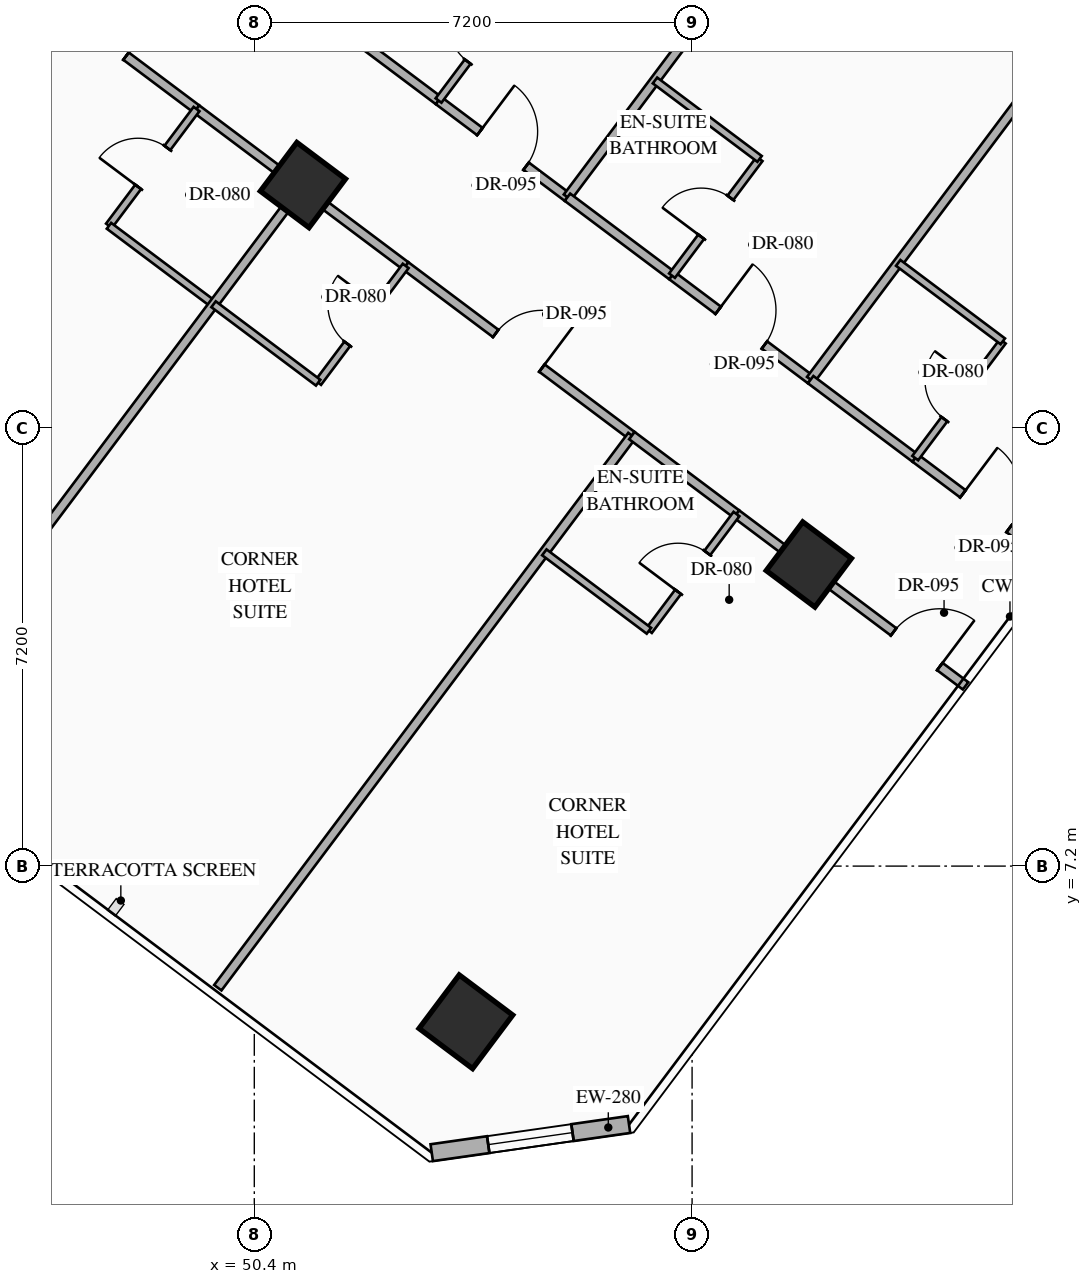
"""IFC4 building model, lengths in metres.
Left out: names, types, materials, properties, quantities, classifications, styles, units other than length and angle.
Written with IfcOpenShell. Run it as: python <this file> out.ifc"""

import sys

from ifc_helpers import new_model, si_unit, direction, frame, frame_2d, origin, origin_2d, place, context, subcontext, project, spatial, rectangle, hollow_rectangle, extrude, element, fill, save


model = new_model("IFC4")
c1 = context("Model", 3, precision=1e-05, world=origin(), true_north=direction((0.0, 1.0)))
c2 = subcontext(c1, "Body", "Model", "MODEL_VIEW")
j1 = project(units=[si_unit("LENGTHUNIT", "METRE"), si_unit("PLANEANGLEUNIT", "RADIAN")], contexts=[c1])
p1 = place(None, origin())
s1 = spatial("IfcSite", under=j1, at=p1, CompositionType="ELEMENT")
p2 = place(p1, origin())
s2 = spatial("IfcBuilding", under=s1, at=p2, CompositionType="ELEMENT")
p3 = place(p2, frame((0.0, 0.0, 63.4)))
s3 = spatial("IfcBuildingStorey", under=s2, at=p3, CompositionType="ELEMENT", Elevation=63.4)
p4 = place(p3, frame((51.2, 18.4, 0.0), z_axis=(0.0, 0.0, 1.0), x_axis=(0.799999996291, -0.600000004945, 0.0)))
e1 = element("IfcColumn", 1, at=p4, inside=s3, PredefinedType="COLUMN", context=c2, shape_type="SweptSolid", body=[
    extrude(hollow_rectangle(XDim=1.0, YDim=1.0, WallThickness=0.038, at=origin_2d()), origin(), (0.0, 0.0, 1.0), 3.35),
])
p5 = place(p3, frame((53.88, 4.64, 0.0), z_axis=(0.0, 0.0, 1.0), x_axis=(0.799999996291, -0.600000004945, 0.0)))
e2 = element("IfcColumn", 2, at=p5, inside=s3, PredefinedType="COLUMN", context=c2, shape_type="SweptSolid", body=[
    extrude(hollow_rectangle(XDim=1.1, YDim=1.1, WallThickness=0.04, at=origin_2d()), origin(), (0.0, 0.0, 1.0), 3.35),
])
p6 = place(p3, frame((59.52, 12.16, 0.0), z_axis=(0.0, 0.0, 1.0), x_axis=(0.799999996291, -0.600000004945, 0.0)))
e3 = element("IfcColumn", 3, at=p6, inside=s3, PredefinedType="COLUMN", context=c2, shape_type="SweptSolid", body=[
    extrude(hollow_rectangle(XDim=1.0, YDim=1.0, WallThickness=0.038, at=origin_2d()), origin(), (0.0, 0.0, 1.0), 3.35),
])
p7 = place(p3, frame((56.563, 2.95, 0.0), z_axis=(0.0, 0.0, 1.0), x_axis=(-0.989977778067, -0.141223223777, 0.0)))
e4 = element("IfcWall", 4, at=p7, inside=s3, PredefinedType="STANDARD", context=c2, shape_type="SweptSolid", body=[
    extrude(rectangle(XDim=3.278, YDim=0.28, at=frame_2d((1.639, 0.0))), origin(), (0.0, 0.0, 1.0), 3.13),
])
p8 = place(p7, frame((0.939, 0.0, 0.85)))
e5 = element("IfcOpeningElement", 5, at=p8, cuts=e4, PredefinedType="OPENING", context=c2, shape_type="SweptSolid", body=[
    extrude(rectangle(XDim=1.4, YDim=1.8, at=frame_2d((0.7, 0.9))), frame((0.0, 0.15, 0.0), z_axis=(0.0, -1.0, 0.0), x_axis=(1.0, 0.0, 0.0)), (0.0, 0.0, 1.0), 0.3),
])
p9 = place(p3, frame((51.71, 21.08, 0.0), z_axis=(0.0, 0.0, 1.0), x_axis=(0.79998637334, -0.60001816845, 0.0)))
e6 = element("IfcWall", 6, at=p9, inside=s3, PredefinedType="PARTITIONING", context=c2, shape_type="SweptSolid", body=[
    extrude(rectangle(XDim=2.15, YDim=0.15, at=frame_2d((1.075, 0.0))), origin(), (0.0, 0.0, 1.0), 2.775),
])
p10 = place(p3, frame((53.43, 19.79, 0.0), z_axis=(0.0, 0.0, 1.0), x_axis=(0.8, -0.6, 0.0)))
e7 = element("IfcWall", 7, at=p10, inside=s3, PredefinedType="PARTITIONING", context=c2, shape_type="SweptSolid", body=[
    extrude(rectangle(XDim=2.65, YDim=0.15, at=frame_2d((1.325, 0.0))), origin(), (0.0, 0.0, 1.0), 2.775),
])
p11 = place(p10, frame((0.85, 0.0, 0.0)))
e8 = element("IfcOpeningElement", 8, at=p11, cuts=e7, PredefinedType="OPENING", context=c2, shape_type="SweptSolid", body=[
    extrude(rectangle(XDim=0.95, YDim=2.15, at=frame_2d((0.475, 1.075))), frame((0.0, 0.085, 0.0), z_axis=(0.0, -1.0, 0.0), x_axis=(1.0, 0.0, 0.0)), (0.0, 0.0, 1.0), 0.17),
])
p12 = place(p3, frame((53.43, 19.79, 0.0), z_axis=(0.0, 0.0, 1.0), x_axis=(0.600065100855, 0.79995117022, 0.0)))
e9 = element("IfcWall", 9, at=p12, inside=s3, PredefinedType="PARTITIONING", context=c2, shape_type="SweptSolid", body=[
    extrude(rectangle(XDim=2.4, YDim=0.12, at=frame_2d((1.2, 0.0))), origin(), (0.0, 0.0, 1.0), 3.13),
])
p13 = place(p12, frame((0.8, 0.0, 0.0)))
e10 = element("IfcOpeningElement", 10, at=p13, cuts=e9, PredefinedType="OPENING", context=c2, shape_type="SweptSolid", body=[
    extrude(rectangle(XDim=0.8, YDim=2.06, at=frame_2d((0.4, 1.03))), frame((0.0, 0.07, 0.0), z_axis=(0.0, -1.0, 0.0), x_axis=(1.0, 0.0, 0.0)), (0.0, 0.0, 1.0), 0.14),
])
p14 = place(p3, frame((55.55, 18.2, 0.0), z_axis=(0.0, 0.0, 1.0), x_axis=(0.599996617946, 0.80000253653, 0.0)))
e11 = element("IfcWall", 11, at=p14, inside=s3, PredefinedType="PARTITIONING", context=c2, shape_type="SweptSolid", body=[
    extrude(rectangle(XDim=11.55, YDim=0.15, at=frame_2d((5.775, 0.0))), origin(), (0.0, 0.0, 1.0), 3.13),
])
p15 = place(p3, frame((55.55, 18.2, 0.0), z_axis=(0.0, 0.0, 1.0), x_axis=(0.79998637334, -0.60001816845, 0.0)))
e12 = element("IfcWall", 12, at=p15, inside=s3, PredefinedType="PARTITIONING", context=c2, shape_type="SweptSolid", body=[
    extrude(rectangle(XDim=2.15, YDim=0.15, at=frame_2d((1.075, 0.0))), origin(), (0.0, 0.0, 1.0), 2.775),
])
p16 = place(p3, frame((57.27, 16.91, 0.0), z_axis=(0.0, 0.0, 1.0), x_axis=(0.800010279488, -0.599986293772, 0.0)))
e13 = element("IfcWall", 13, at=p16, inside=s3, PredefinedType="PARTITIONING", context=c2, shape_type="SweptSolid", body=[
    extrude(rectangle(XDim=2.85, YDim=0.15, at=frame_2d((1.425, 0.0))), origin(), (0.0, 0.0, 1.0), 2.775),
])
p17 = place(p16, frame((0.95, 0.0, 0.0)))
e14 = element("IfcOpeningElement", 14, at=p17, cuts=e13, PredefinedType="OPENING", context=c2, shape_type="SweptSolid", body=[
    extrude(rectangle(XDim=0.95, YDim=2.15, at=frame_2d((0.475, 1.075))), frame((0.0, 0.085, 0.0), z_axis=(0.0, -1.0, 0.0), x_axis=(1.0, 0.0, 0.0)), (0.0, 0.0, 1.0), 0.17),
])
p18 = place(p3, frame((57.27, 16.91, 0.0), z_axis=(0.0, 0.0, 1.0), x_axis=(0.599951172744, 0.800036618114, 0.0)))
e15 = element("IfcWall", 15, at=p18, inside=s3, PredefinedType="PARTITIONING", context=c2, shape_type="SweptSolid", body=[
    extrude(rectangle(XDim=2.4, YDim=0.12, at=frame_2d((1.2, 0.0))), origin(), (0.0, 0.0, 1.0), 3.13),
])
p19 = place(p18, frame((0.8, 0.0, 0.0)))
e16 = element("IfcOpeningElement", 16, at=p19, cuts=e15, PredefinedType="OPENING", context=c2, shape_type="SweptSolid", body=[
    extrude(rectangle(XDim=0.8, YDim=2.06, at=frame_2d((0.4, 1.03))), frame((0.0, 0.07, 0.0), z_axis=(0.0, -1.0, 0.0), x_axis=(1.0, 0.0, 0.0)), (0.0, 0.0, 1.0), 0.14),
])
p20 = place(p3, frame((56.99, 20.12, 0.0), z_axis=(0.0, 0.0, 1.0), x_axis=(0.79998637334, -0.60001816845, 0.0)))
e17 = element("IfcWall", 17, at=p20, inside=s3, PredefinedType="PARTITIONING", context=c2, shape_type="SweptSolid", body=[
    extrude(rectangle(XDim=2.15, YDim=0.12, at=frame_2d((1.075, 0.0))), origin(), (0.0, 0.0, 1.0), 3.13),
])
p21 = place(p3, frame((59.55, 15.2, 0.0), z_axis=(0.0, 0.0, 1.0), x_axis=(0.599996617946, 0.80000253653, 0.0)))
e18 = element("IfcWall", 18, at=p21, inside=s3, PredefinedType="PARTITIONING", context=c2, shape_type="SweptSolid", body=[
    extrude(rectangle(XDim=11.55, YDim=0.15, at=frame_2d((5.775, 0.0))), origin(), (0.0, 0.0, 1.0), 3.13),
])
p22 = place(p3, frame((59.55, 15.2, 0.0), z_axis=(0.0, 0.0, 1.0), x_axis=(0.79998637334, -0.60001816845, 0.0)))
e19 = element("IfcWall", 19, at=p22, inside=s3, PredefinedType="PARTITIONING", context=c2, shape_type="SweptSolid", body=[
    extrude(rectangle(XDim=2.15, YDim=0.15, at=frame_2d((1.075, 0.0))), origin(), (0.0, 0.0, 1.0), 2.775),
])
p23 = place(p3, frame((61.27, 13.91, 0.0), z_axis=(0.0, 0.0, 1.0), x_axis=(0.800010068184, -0.59998657552, 0.0)))
e20 = element("IfcWall", 20, at=p23, inside=s3, PredefinedType="PARTITIONING", context=c2, shape_type="SweptSolid", body=[
    extrude(rectangle(XDim=2.91, YDim=0.15, at=frame_2d((1.455, 0.0))), origin(), (0.0, 0.0, 1.0), 3.13),
])
p24 = place(p23, frame((0.98, 0.0, 0.0)))
e21 = element("IfcOpeningElement", 21, at=p24, cuts=e20, PredefinedType="OPENING", context=c2, shape_type="SweptSolid", body=[
    extrude(rectangle(XDim=0.95, YDim=2.15, at=frame_2d((0.475, 1.075))), frame((0.0, 0.085, 0.0), z_axis=(0.0, -1.0, 0.0), x_axis=(1.0, 0.0, 0.0)), (0.0, 0.0, 1.0), 0.17),
])
p25 = place(p3, frame((61.27, 13.91, 0.0), z_axis=(0.0, 0.0, 1.0), x_axis=(0.599951172744, 0.800036618114, 0.0)))
e22 = element("IfcWall", 22, at=p25, inside=s3, PredefinedType="PARTITIONING", context=c2, shape_type="SweptSolid", body=[
    extrude(rectangle(XDim=2.4, YDim=0.12, at=frame_2d((1.2, 0.0))), origin(), (0.0, 0.0, 1.0), 3.13),
])
p26 = place(p25, frame((0.8, 0.0, 0.0)))
e23 = element("IfcOpeningElement", 23, at=p26, cuts=e22, PredefinedType="OPENING", context=c2, shape_type="SweptSolid", body=[
    extrude(rectangle(XDim=0.8, YDim=2.06, at=frame_2d((0.4, 1.03))), frame((0.0, 0.07, 0.0), z_axis=(0.0, -1.0, 0.0), x_axis=(1.0, 0.0, 0.0)), (0.0, 0.0, 1.0), 0.14),
])
p27 = place(p3, frame((60.99, 17.12, 0.0), z_axis=(0.0, 0.0, 1.0), x_axis=(0.79998637334, -0.60001816845, 0.0)))
e24 = element("IfcWall", 24, at=p27, inside=s3, PredefinedType="PARTITIONING", context=c2, shape_type="SweptSolid", body=[
    extrude(rectangle(XDim=2.15, YDim=0.12, at=frame_2d((1.075, 0.0))), origin(), (0.0, 0.0, 1.0), 3.13),
])
p28 = place(p3, frame((46.37, 21.96, 0.0), z_axis=(0.0, 0.0, 1.0), x_axis=(0.799977170108, -0.600030438649, 0.0)))
e25 = element("IfcWall", 25, at=p28, inside=s3, PredefinedType="PARTITIONING", context=c2, shape_type="SweptSolid", body=[
    extrude(rectangle(XDim=3.85, YDim=0.15, at=frame_2d((1.925, 0.0))), origin(), (0.0, 0.0, 1.0), 2.425),
])
p29 = place(p28, frame((1.45, 0.0, 0.0)))
e26 = element("IfcOpeningElement", 26, at=p29, cuts=e25, PredefinedType="OPENING", context=c2, shape_type="SweptSolid", body=[
    extrude(rectangle(XDim=0.95, YDim=2.15, at=frame_2d((0.475, 1.075))), frame((0.0, 0.085, 0.0), z_axis=(0.0, -1.0, 0.0), x_axis=(1.0, 0.0, 0.0)), (0.0, 0.0, 1.0), 0.17),
])
p30 = place(p3, frame((49.45, 19.65, 0.0), z_axis=(0.0, 0.0, 1.0), x_axis=(0.800040880289, -0.59994548908, 0.0)))
e27 = element("IfcWall", 27, at=p30, inside=s3, PredefinedType="PARTITIONING", context=c2, shape_type="SweptSolid", body=[
    extrude(rectangle(XDim=2.15, YDim=0.15, at=frame_2d((1.075, 0.0))), origin(), (0.0, 0.0, 1.0), 2.425),
])
p31 = place(p3, frame((48.01, 17.73, 0.0), z_axis=(0.0, 0.0, 1.0), x_axis=(0.6, 0.8, 0.0)))
e28 = element("IfcWall", 28, at=p31, inside=s3, PredefinedType="PARTITIONING", context=c2, shape_type="SweptSolid", body=[
    extrude(rectangle(XDim=2.4, YDim=0.12, at=frame_2d((1.2, 0.0))), origin(), (0.0, 0.0, 1.0), 3.13),
])
p32 = place(p31, frame((0.8, 0.0, 0.0)))
e29 = element("IfcOpeningElement", 29, at=p32, cuts=e28, PredefinedType="OPENING", context=c2, shape_type="SweptSolid", body=[
    extrude(rectangle(XDim=0.8, YDim=2.06, at=frame_2d((0.4, 1.03))), frame((0.0, 0.07, 0.0), z_axis=(0.0, -1.0, 0.0), x_axis=(1.0, 0.0, 0.0)), (0.0, 0.0, 1.0), 0.14),
])
p33 = place(p3, frame((48.01, 17.73, 0.0), z_axis=(0.0, 0.0, 1.0), x_axis=(0.79998637334, -0.60001816845, 0.0)))
e30 = element("IfcWall", 30, at=p33, inside=s3, PredefinedType="PARTITIONING", context=c2, shape_type="SweptSolid", body=[
    extrude(rectangle(XDim=2.15, YDim=0.12, at=frame_2d((1.075, 0.0))), origin(), (0.0, 0.0, 1.0), 3.13),
])
p34 = place(p3, frame((44.36, 9.28, 0.0), z_axis=(0.0, 0.0, 1.0), x_axis=(0.599986233332, 0.800010324816, 0.0)))
e31 = element("IfcWall", 31, at=p34, inside=s3, PredefinedType="PARTITIONING", context=c2, shape_type="SweptSolid", body=[
    extrude(rectangle(XDim=11.35, YDim=0.15, at=frame_2d((5.675, 0.0))), origin(), (0.0, 0.0, 1.0), 2.425),
])
p35 = place(p3, frame((51.17, 18.36, 0.0), z_axis=(0.0, 0.0, 1.0), x_axis=(0.79998637334, -0.60001816845, 0.0)))
e32 = element("IfcWall", 32, at=p35, inside=s3, PredefinedType="PARTITIONING", context=c2, shape_type="SweptSolid", body=[
    extrude(rectangle(XDim=2.15, YDim=0.15, at=frame_2d((1.075, 0.0))), origin(), (0.0, 0.0, 1.0), 2.425),
])
p36 = place(p3, frame((52.89, 17.07, 0.0), z_axis=(0.0, 0.0, 1.0), x_axis=(0.800012600101, -0.599983199498, 0.0)))
e33 = element("IfcWall", 33, at=p36, inside=s3, PredefinedType="PARTITIONING", context=c2, shape_type="SweptSolid", body=[
    extrude(rectangle(XDim=4.65, YDim=0.15, at=frame_2d((2.325, 0.0))), origin(), (0.0, 0.0, 1.0), 2.425),
])
p37 = place(p36, frame((1.85, 0.0, 0.0)))
e34 = element("IfcOpeningElement", 34, at=p37, cuts=e33, PredefinedType="OPENING", context=c2, shape_type="SweptSolid", body=[
    extrude(rectangle(XDim=0.95, YDim=2.15, at=frame_2d((0.475, 1.075))), frame((0.0, 0.085, 0.0), z_axis=(0.0, -1.0, 0.0), x_axis=(1.0, 0.0, 0.0)), (0.0, 0.0, 1.0), 0.17),
])
p38 = place(p3, frame((51.45, 15.15, 0.0), z_axis=(0.0, 0.0, 1.0), x_axis=(0.599951172744, 0.800036618114, 0.0)))
e35 = element("IfcWall", 35, at=p38, inside=s3, PredefinedType="PARTITIONING", context=c2, shape_type="SweptSolid", body=[
    extrude(rectangle(XDim=2.4, YDim=0.12, at=frame_2d((1.2, 0.0))), origin(), (0.0, 0.0, 1.0), 3.13),
])
p39 = place(p38, frame((0.8, 0.0, 0.0)))
e36 = element("IfcOpeningElement", 36, at=p39, cuts=e35, PredefinedType="OPENING", context=c2, shape_type="SweptSolid", body=[
    extrude(rectangle(XDim=0.8, YDim=2.06, at=frame_2d((0.4, 1.03))), frame((0.0, 0.07, 0.0), z_axis=(0.0, -1.0, 0.0), x_axis=(1.0, 0.0, 0.0)), (0.0, 0.0, 1.0), 0.14),
])
p40 = place(p3, frame((49.73, 16.44, 0.0), z_axis=(0.0, 0.0, 1.0), x_axis=(0.79998637334, -0.60001816845, 0.0)))
e37 = element("IfcWall", 37, at=p40, inside=s3, PredefinedType="PARTITIONING", context=c2, shape_type="SweptSolid", body=[
    extrude(rectangle(XDim=2.15, YDim=0.12, at=frame_2d((1.075, 0.0))), origin(), (0.0, 0.0, 1.0), 3.13),
])
p41 = place(p3, frame((49.8, 5.2, 0.0), z_axis=(0.0, 0.0, 1.0), x_axis=(0.6, 0.8, 0.0)))
e38 = element("IfcWall", 38, at=p41, inside=s3, PredefinedType="PARTITIONING", context=c2, shape_type="SweptSolid", body=[
    extrude(rectangle(XDim=11.35, YDim=0.15, at=frame_2d((5.675, 0.0))), origin(), (0.0, 0.0, 1.0), 3.13),
])
p42 = place(p3, frame((56.61, 14.28, 0.0), z_axis=(0.0, 0.0, 1.0), x_axis=(0.79998637334, -0.60001816845, 0.0)))
e39 = element("IfcWall", 39, at=p42, inside=s3, PredefinedType="PARTITIONING", context=c2, shape_type="SweptSolid", body=[
    extrude(rectangle(XDim=2.15, YDim=0.15, at=frame_2d((1.075, 0.0))), origin(), (0.0, 0.0, 1.0), 2.425),
])
p43 = place(p3, frame((58.33, 12.99, 0.0), z_axis=(0.0, 0.0, 1.0), x_axis=(0.799993779569, -0.600008293819, 0.0)))
e40 = element("IfcWall", 40, at=p43, inside=s3, PredefinedType="PARTITIONING", context=c2, shape_type="SweptSolid", body=[
    extrude(rectangle(XDim=4.71, YDim=0.15, at=frame_2d((2.355, 0.0))), origin(), (0.0, 0.0, 1.0), 2.425),
])
p44 = place(p43, frame((3.23, 0.0, 0.0)))
e41 = element("IfcOpeningElement", 41, at=p44, cuts=e40, PredefinedType="OPENING", context=c2, shape_type="SweptSolid", body=[
    extrude(rectangle(XDim=0.95, YDim=2.15, at=frame_2d((0.475, 1.075))), frame((0.0, 0.085, 0.0), z_axis=(0.0, -1.0, 0.0), x_axis=(1.0, 0.0, 0.0)), (0.0, 0.0, 1.0), 0.17),
])
p45 = place(p3, frame((56.89, 11.07, 0.0), z_axis=(0.0, 0.0, 1.0), x_axis=(0.600065100855, 0.79995117022, 0.0)))
e42 = element("IfcWall", 42, at=p45, inside=s3, PredefinedType="PARTITIONING", context=c2, shape_type="SweptSolid", body=[
    extrude(rectangle(XDim=2.4, YDim=0.12, at=frame_2d((1.2, 0.0))), origin(), (0.0, 0.0, 1.0), 3.13),
])
p46 = place(p45, frame((0.8, 0.0, 0.0)))
e43 = element("IfcOpeningElement", 43, at=p46, cuts=e42, PredefinedType="OPENING", context=c2, shape_type="SweptSolid", body=[
    extrude(rectangle(XDim=0.8, YDim=2.06, at=frame_2d((0.4, 1.03))), frame((0.0, 0.07, 0.0), z_axis=(0.0, -1.0, 0.0), x_axis=(1.0, 0.0, 0.0)), (0.0, 0.0, 1.0), 0.14),
])
p47 = place(p3, frame((55.17, 12.36, 0.0), z_axis=(0.0, 0.0, 1.0), x_axis=(0.79998637334, -0.60001816845, 0.0)))
e44 = element("IfcWall", 44, at=p47, inside=s3, PredefinedType="PARTITIONING", context=c2, shape_type="SweptSolid", body=[
    extrude(rectangle(XDim=2.15, YDim=0.12, at=frame_2d((1.075, 0.0))), origin(), (0.0, 0.0, 1.0), 3.13),
])
p48 = place(p8, origin())
e45 = element("IfcWindow", 45, at=p48, inside=s3, PartitioningType="SINGLE_PANEL", PredefinedType="WINDOW", context=c2, shape_type="SweptSolid", body=[
    extrude(rectangle(XDim=1.4, YDim=1.8, at=frame_2d((0.7, 0.9))), frame((0.0, 0.03, 0.0), z_axis=(0.0, -1.0, 0.0), x_axis=(1.0, 0.0, 0.0)), (0.0, 0.0, 1.0), 0.06),
])
fill(e5, e45)
p49 = place(p11, origin())
e46 = element("IfcDoor", 46, at=p49, inside=s3, OperationType="SINGLE_SWING_LEFT", PredefinedType="DOOR", context=c2, shape_type="SweptSolid", body=[
    extrude(rectangle(XDim=0.95, YDim=2.15, at=frame_2d((0.475, 1.075))), frame((0.0, 0.025, 0.0), z_axis=(0.0, -1.0, 0.0), x_axis=(1.0, 0.0, 0.0)), (0.0, 0.0, 1.0), 0.05),
])
fill(e8, e46)
p50 = place(p13, origin())
e47 = element("IfcDoor", 47, at=p50, inside=s3, OperationType="SINGLE_SWING_RIGHT", PredefinedType="DOOR", context=c2, shape_type="SweptSolid", body=[
    extrude(rectangle(XDim=0.8, YDim=2.06, at=frame_2d((0.4, 1.03))), frame((0.0, 0.025, 0.0), z_axis=(0.0, -1.0, 0.0), x_axis=(1.0, 0.0, 0.0)), (0.0, 0.0, 1.0), 0.05),
])
fill(e10, e47)
p51 = place(p17, origin())
e48 = element("IfcDoor", 48, at=p51, inside=s3, OperationType="SINGLE_SWING_LEFT", PredefinedType="DOOR", context=c2, shape_type="SweptSolid", body=[
    extrude(rectangle(XDim=0.95, YDim=2.15, at=frame_2d((0.475, 1.075))), frame((0.0, 0.025, 0.0), z_axis=(0.0, -1.0, 0.0), x_axis=(1.0, 0.0, 0.0)), (0.0, 0.0, 1.0), 0.05),
])
fill(e14, e48)
p52 = place(p19, origin())
e49 = element("IfcDoor", 49, at=p52, inside=s3, OperationType="SINGLE_SWING_LEFT", PredefinedType="DOOR", context=c2, shape_type="SweptSolid", body=[
    extrude(rectangle(XDim=0.8, YDim=2.06, at=frame_2d((0.4, 1.03))), frame((0.0, 0.025, 0.0), z_axis=(0.0, -1.0, 0.0), x_axis=(1.0, 0.0, 0.0)), (0.0, 0.0, 1.0), 0.05),
])
fill(e16, e49)
p53 = place(p24, origin())
e50 = element("IfcDoor", 50, at=p53, inside=s3, OperationType="SINGLE_SWING_LEFT", PredefinedType="DOOR", context=c2, shape_type="SweptSolid", body=[
    extrude(rectangle(XDim=0.95, YDim=2.15, at=frame_2d((0.475, 1.075))), frame((0.0, 0.025, 0.0), z_axis=(0.0, -1.0, 0.0), x_axis=(1.0, 0.0, 0.0)), (0.0, 0.0, 1.0), 0.05),
])
fill(e21, e50)
p54 = place(p26, origin())
e51 = element("IfcDoor", 51, at=p54, inside=s3, OperationType="SINGLE_SWING_RIGHT", PredefinedType="DOOR", context=c2, shape_type="SweptSolid", body=[
    extrude(rectangle(XDim=0.8, YDim=2.06, at=frame_2d((0.4, 1.03))), frame((0.0, 0.025, 0.0), z_axis=(0.0, -1.0, 0.0), x_axis=(1.0, 0.0, 0.0)), (0.0, 0.0, 1.0), 0.05),
])
fill(e23, e51)
p55 = place(p29, origin())
e52 = element("IfcDoor", 52, at=p55, inside=s3, OperationType="SINGLE_SWING_RIGHT", PredefinedType="DOOR", context=c2, shape_type="SweptSolid", body=[
    extrude(rectangle(XDim=0.95, YDim=2.15, at=frame_2d((0.475, 1.075))), frame((0.0, 0.025, 0.0), z_axis=(0.0, -1.0, 0.0), x_axis=(1.0, 0.0, 0.0)), (0.0, 0.0, 1.0), 0.05),
])
fill(e26, e52)
p56 = place(p32, origin())
e53 = element("IfcDoor", 53, at=p56, inside=s3, OperationType="SINGLE_SWING_LEFT", PredefinedType="DOOR", context=c2, shape_type="SweptSolid", body=[
    extrude(rectangle(XDim=0.8, YDim=2.06, at=frame_2d((0.4, 1.03))), frame((0.0, 0.025, 0.0), z_axis=(0.0, -1.0, 0.0), x_axis=(1.0, 0.0, 0.0)), (0.0, 0.0, 1.0), 0.05),
])
fill(e29, e53)
p57 = place(p37, origin())
e54 = element("IfcDoor", 54, at=p57, inside=s3, OperationType="SINGLE_SWING_RIGHT", PredefinedType="DOOR", context=c2, shape_type="SweptSolid", body=[
    extrude(rectangle(XDim=0.95, YDim=2.15, at=frame_2d((0.475, 1.075))), frame((0.0, 0.025, 0.0), z_axis=(0.0, -1.0, 0.0), x_axis=(1.0, 0.0, 0.0)), (0.0, 0.0, 1.0), 0.05),
])
fill(e34, e54)
p58 = place(p39, origin())
e55 = element("IfcDoor", 55, at=p58, inside=s3, OperationType="SINGLE_SWING_RIGHT", PredefinedType="DOOR", context=c2, shape_type="SweptSolid", body=[
    extrude(rectangle(XDim=0.8, YDim=2.06, at=frame_2d((0.4, 1.03))), frame((0.0, 0.025, 0.0), z_axis=(0.0, -1.0, 0.0), x_axis=(1.0, 0.0, 0.0)), (0.0, 0.0, 1.0), 0.05),
])
fill(e36, e55)
p59 = place(p44, origin())
e56 = element("IfcDoor", 56, at=p59, inside=s3, OperationType="SINGLE_SWING_RIGHT", PredefinedType="DOOR", context=c2, shape_type="SweptSolid", body=[
    extrude(rectangle(XDim=0.95, YDim=2.15, at=frame_2d((0.475, 1.075))), frame((0.0, 0.025, 0.0), z_axis=(0.0, -1.0, 0.0), x_axis=(1.0, 0.0, 0.0)), (0.0, 0.0, 1.0), 0.05),
])
fill(e41, e56)
p60 = place(p46, origin())
e57 = element("IfcDoor", 57, at=p60, inside=s3, OperationType="SINGLE_SWING_LEFT", PredefinedType="DOOR", context=c2, shape_type="SweptSolid", body=[
    extrude(rectangle(XDim=0.8, YDim=2.06, at=frame_2d((0.4, 1.03))), frame((0.0, 0.025, 0.0), z_axis=(0.0, -1.0, 0.0), x_axis=(1.0, 0.0, 0.0)), (0.0, 0.0, 1.0), 0.05),
])
fill(e43, e57)
save(model, sys.argv[1])
